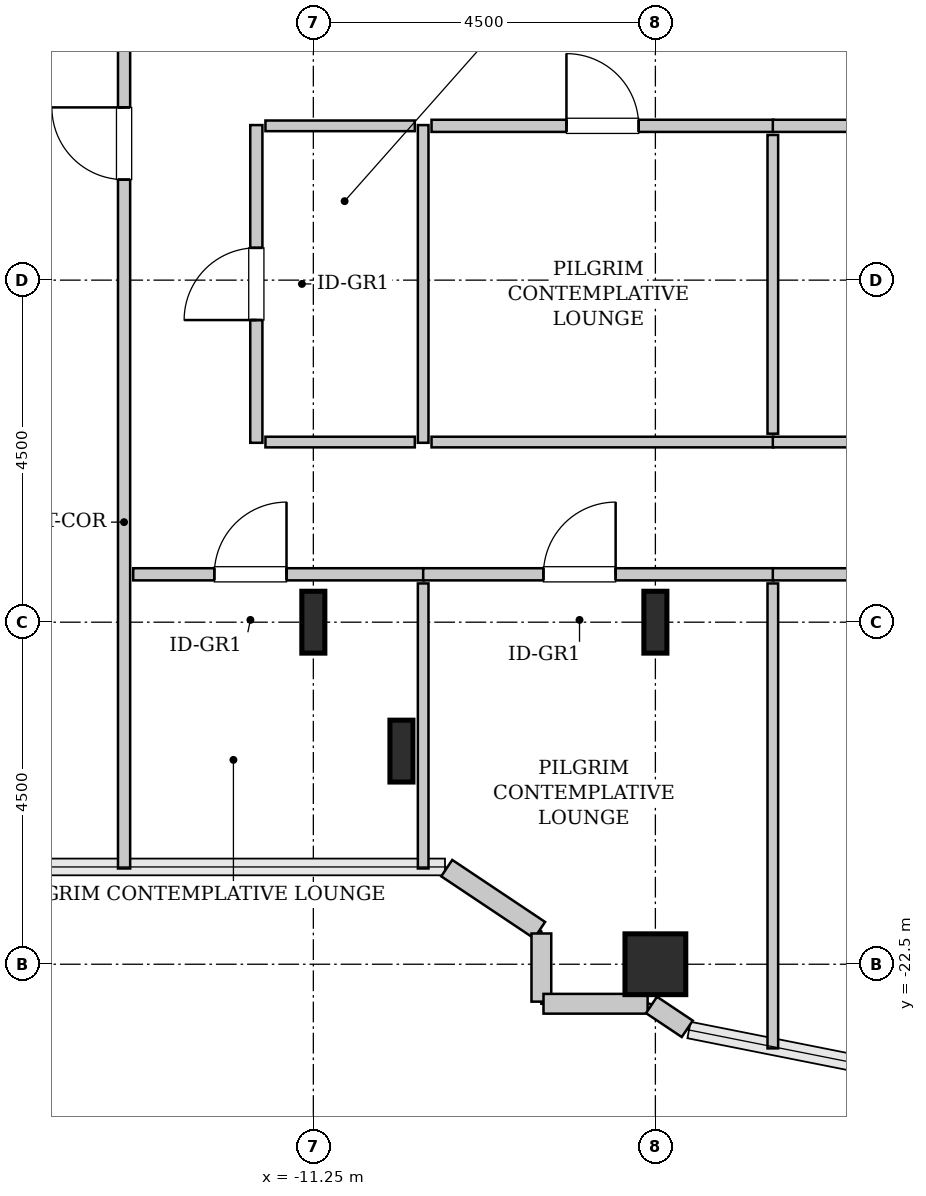
"""IFC4 building model, lengths in metres.
Left out: names, types, materials, properties, quantities, classifications, styles, units other than length and angle.
Written with IfcOpenShell. Run it as: python <this file> out.ifc"""

import sys

from ifc_helpers import new_model, si_unit, direction, frame, frame_2d, origin, origin_2d, place, context, subcontext, project, spatial, rectangle, hollow_rectangle, i_section, extrude, source, transform, mapped, element, fill, save


model = new_model("IFC4")
c1 = context("Model", 3, precision=1e-05, world=origin(), true_north=direction((0.0, 1.0)))
c2 = subcontext(c1, "Body", "Model", "MODEL_VIEW")
j1 = project(units=[si_unit("LENGTHUNIT", "METRE"), si_unit("PLANEANGLEUNIT", "RADIAN")], contexts=[c1])
p1 = place(None, origin())
s1 = spatial("IfcSite", under=j1, at=p1, CompositionType="ELEMENT")
p2 = place(p1, origin())
s2 = spatial("IfcBuilding", under=s1, at=p2, CompositionType="ELEMENT")
p3 = place(p2, frame((0.0, 0.0, 175.4)))
s3 = spatial("IfcBuildingStorey", under=s2, at=p3, CompositionType="ELEMENT", Elevation=175.4)
m1 = source(origin(), c2, "Body", "SweptSolid", [
    extrude(i_section(OverallWidth=0.303, OverallDepth=0.814, WebThickness=0.021, FlangeThickness=0.04, FilletRadius=0.03, at=origin_2d()), origin(), (0.0, 0.0, 1.0), 3.8),
])
for number, where, z_axis, x_axis in (
    (1, (-11.25, -18.0, 0.0), (0.0, 0.0, 1.0), (1.0, 0.0, 0.0)),
    (2, (-10.091, -19.696, 0.0), (0.0, 0.0, 1.0), (1.0, 0.0, 0.0)),
):
    element("IfcColumn", number, at=place(p3, frame(where, z_axis=z_axis, x_axis=x_axis)), inside=s3, PredefinedType="COLUMN", context=c2, shape_type="MappedRepresentation", body=[
        mapped(m1, transform((0.0, 0.0, 0.0), x_axis=(1.0, 0.0, 0.0), y_axis=(0.0, 1.0, 0.0), z_axis=(0.0, 0.0, 1.0), scale=1.0)),
    ])
m2 = source(origin(), c2, "Body", "SweptSolid", [
    extrude(hollow_rectangle(XDim=0.8, YDim=0.8, WallThickness=0.04, InnerFilletRadius=0.04, OuterFilletRadius=0.08, at=origin_2d()), origin(), (0.0, 0.0, 1.0), 3.8),
])
p4 = place(p3, frame((-6.75, -22.5, 0.0), z_axis=(0.0, 0.0, 1.0), x_axis=(1.0, 0.0, 0.0)))
e3 = element("IfcColumn", 3, at=p4, inside=s3, PredefinedType="COLUMN", context=c2, shape_type="MappedRepresentation", body=[
    mapped(m2, transform((0.0, 0.0, 0.0), x_axis=(1.0, 0.0, 0.0), y_axis=(0.0, 1.0, 0.0), z_axis=(0.0, 0.0, 1.0), scale=1.0)),
])
p5 = place(p3, frame((-6.75, -18.0, 0.0), z_axis=(0.0, 0.0, 1.0), x_axis=(1.0, 0.0, 0.0)))
e4 = element("IfcColumn", 4, at=p5, inside=s3, PredefinedType="COLUMN", context=c2, shape_type="MappedRepresentation", body=[
    mapped(m1, transform((0.0, 0.0, 0.0), x_axis=(1.0, 0.0, 0.0), y_axis=(0.0, 1.0, 0.0), z_axis=(0.0, 0.0, 1.0), scale=1.0)),
])
m3 = source(origin(), c2, "Body", "SweptSolid", [
    extrude(rectangle(XDim=1.469, YDim=0.26, at=frame_2d((0.734, 0.0))), origin(), (0.0, 0.0, 1.0), 3.55),
])
p6 = place(p3, frame((-9.495, -21.236, 0.0), z_axis=(0.0, 0.0, 1.0), x_axis=(0.831461760506, -0.555581983884, 0.0)))
e5 = element("IfcWall", 5, at=p6, inside=s3, PredefinedType="SOLIDWALL", context=c2, shape_type="MappedRepresentation", body=[
    mapped(m3, transform((0.0, 0.0, 0.0), x_axis=(1.0, 0.0, 0.0), y_axis=(0.0, 1.0, 0.0), z_axis=(0.0, 0.0, 1.0), scale=1.0)),
])
m4 = source(origin(), c2, "Body", "SweptSolid", [
    extrude(rectangle(XDim=0.897, YDim=0.26, at=frame_2d((0.448, 0.0))), origin(), (0.0, 0.0, 1.0), 3.55),
])
p7 = place(p3, frame((-8.25, -22.095, 0.0), z_axis=(0.0, 0.0, 1.0), x_axis=(0.0, -1.0, 0.0)))
e6 = element("IfcWall", 6, at=p7, inside=s3, PredefinedType="SOLIDWALL", context=c2, shape_type="MappedRepresentation", body=[
    mapped(m4, transform((0.0, 0.0, 0.0), x_axis=(1.0, 0.0, 0.0), y_axis=(0.0, 1.0, 0.0), z_axis=(0.0, 0.0, 1.0), scale=1.0)),
])
m5 = source(origin(), c2, "Body", "SweptSolid", [
    extrude(rectangle(XDim=1.37, YDim=0.26, at=frame_2d((0.685, 0.0))), origin(), (0.0, 0.0, 1.0), 3.55),
])
p8 = place(p3, frame((-8.222, -23.02, 0.0), z_axis=(0.0, 0.0, 1.0), x_axis=(1.0, 0.0, 0.0)))
e7 = element("IfcWall", 7, at=p8, inside=s3, PredefinedType="SOLIDWALL", context=c2, shape_type="MappedRepresentation", body=[
    mapped(m5, transform((0.0, 0.0, 0.0), x_axis=(1.0, 0.0, 0.0), y_axis=(0.0, 1.0, 0.0), z_axis=(0.0, 0.0, 1.0), scale=1.0)),
])
m6 = source(origin(), c2, "Body", "SweptSolid", [
    extrude(rectangle(XDim=0.565, YDim=0.26, at=frame_2d((0.283, 0.0))), origin(), (0.0, 0.0, 1.0), 3.55),
])
p9 = place(p3, frame((-6.801, -23.036, 0.0), z_axis=(0.0, 0.0, 1.0), x_axis=(0.831651492666, -0.555297933317, 0.0)))
e8 = element("IfcWall", 8, at=p9, inside=s3, PredefinedType="SOLIDWALL", context=c2, shape_type="MappedRepresentation", body=[
    mapped(m6, transform((0.0, 0.0, 0.0), x_axis=(1.0, 0.0, 0.0), y_axis=(0.0, 1.0, 0.0), z_axis=(0.0, 0.0, 1.0), scale=1.0)),
])
m7 = source(origin(), c2, "Body", "SweptSolid", [
    extrude(rectangle(XDim=15.245, YDim=0.16, at=frame_2d((7.623, 0.0))), origin(), (0.0, 0.0, 1.0), 3.535),
])
p10 = place(p3, frame((-13.74, -21.24, 0.0), z_axis=(0.0, 0.0, 1.0), x_axis=(0.0, 1.0, 0.0)))
e9 = element("IfcWall", 9, at=p10, inside=s3, PredefinedType="PARTITIONING", context=c2, shape_type="MappedRepresentation", body=[
    mapped(m7, transform((0.0, 0.0, 0.0), x_axis=(1.0, 0.0, 0.0), y_axis=(0.0, 1.0, 0.0), z_axis=(0.0, 0.0, 1.0), scale=1.0)),
])
p11 = place(p10, frame((9.062, 0.0, 0.0)))
e10 = element("IfcOpeningElement", 10, at=p11, cuts=e9, PredefinedType="OPENING", context=c2, shape_type="SweptSolid", body=[
    extrude(rectangle(XDim=0.95, YDim=2.1, at=frame_2d((0.475, 1.05))), frame((0.0, 0.09, 0.0), z_axis=(0.0, -1.0, 0.0), x_axis=(1.0, 0.0, 0.0)), (0.0, 0.0, 1.0), 0.18),
])
m8 = source(origin(), c2, "Body", "SweptSolid", [
    extrude(rectangle(XDim=3.825, YDim=0.16, at=frame_2d((1.913, 0.0))), origin(), (0.0, 0.0, 1.0), 3.535),
])
p12 = place(p3, frame((-13.62, -17.37, 0.0), z_axis=(0.0, 0.0, 1.0), x_axis=(1.0, 0.0, 0.0)))
e11 = element("IfcWall", 11, at=p12, inside=s3, PredefinedType="PARTITIONING", context=c2, shape_type="MappedRepresentation", body=[
    mapped(m8, transform((0.0, 0.0, 0.0), x_axis=(1.0, 0.0, 0.0), y_axis=(0.0, 1.0, 0.0), z_axis=(0.0, 0.0, 1.0), scale=1.0)),
])
p13 = place(p12, frame((1.067, 0.0, 0.0)))
e12 = element("IfcOpeningElement", 12, at=p13, cuts=e11, PredefinedType="OPENING", context=c2, shape_type="SweptSolid", body=[
    extrude(rectangle(XDim=0.95, YDim=2.1, at=frame_2d((0.475, 1.05))), frame((0.0, 0.09, 0.0), z_axis=(0.0, -1.0, 0.0), x_axis=(1.0, 0.0, 0.0)), (0.0, 0.0, 1.0), 0.18),
])
m9 = source(origin(), c2, "Body", "SweptSolid", [
    extrude(rectangle(XDim=3.75, YDim=0.14, at=frame_2d((1.875, 0.0))), origin(), (0.0, 0.0, 1.0), 3.535),
])
p14 = place(p3, frame((-9.805, -21.24, 0.0), z_axis=(0.0, 0.0, 1.0), x_axis=(0.0, 1.0, 0.0)))
e13 = element("IfcWall", 13, at=p14, inside=s3, PredefinedType="PARTITIONING", context=c2, shape_type="MappedRepresentation", body=[
    mapped(m9, transform((0.0, 0.0, 0.0), x_axis=(1.0, 0.0, 0.0), y_axis=(0.0, 1.0, 0.0), z_axis=(0.0, 0.0, 1.0), scale=1.0)),
])
m10 = source(origin(), c2, "Body", "SweptSolid", [
    extrude(rectangle(XDim=4.18, YDim=0.16, at=frame_2d((2.09, 0.0))), origin(), (0.0, 0.0, 1.0), 3.535),
])
p15 = place(p3, frame((-12.0, -15.64, 0.0), z_axis=(0.0, 0.0, 1.0), x_axis=(0.0, 1.0, 0.0)))
e14 = element("IfcWall", 14, at=p15, inside=s3, PredefinedType="PARTITIONING", context=c2, shape_type="MappedRepresentation", body=[
    mapped(m10, transform((0.0, 0.0, 0.0), x_axis=(1.0, 0.0, 0.0), y_axis=(0.0, 1.0, 0.0), z_axis=(0.0, 0.0, 1.0), scale=1.0)),
])
p16 = place(p15, frame((1.615, 0.0, 0.0)))
e15 = element("IfcOpeningElement", 15, at=p16, cuts=e14, PredefinedType="OPENING", context=c2, shape_type="SweptSolid", body=[
    extrude(rectangle(XDim=0.95, YDim=2.1, at=frame_2d((0.475, 1.05))), frame((0.0, 0.09, 0.0), z_axis=(0.0, -1.0, 0.0), x_axis=(1.0, 0.0, 0.0)), (0.0, 0.0, 1.0), 0.18),
])
m11 = source(origin(), c2, "Body", "SweptSolid", [
    extrude(rectangle(XDim=4.18, YDim=0.14, at=frame_2d((2.09, 0.0))), origin(), (0.0, 0.0, 1.0), 3.535),
])
p17 = place(p3, frame((-9.805, -15.64, 0.0), z_axis=(0.0, 0.0, 1.0), x_axis=(0.0, 1.0, 0.0)))
e16 = element("IfcWall", 16, at=p17, inside=s3, PredefinedType="PARTITIONING", context=c2, shape_type="MappedRepresentation", body=[
    mapped(m11, transform((0.0, 0.0, 0.0), x_axis=(1.0, 0.0, 0.0), y_axis=(0.0, 1.0, 0.0), z_axis=(0.0, 0.0, 1.0), scale=1.0)),
])
m12 = source(origin(), c2, "Body", "SweptSolid", [
    extrude(rectangle(XDim=1.965, YDim=0.14, at=frame_2d((0.982, 0.0))), origin(), (0.0, 0.0, 1.0), 3.535),
])
for number, where, z_axis, x_axis in (
    (17, (-11.88, -11.47, 0.0), (0.0, 0.0, 1.0), (1.0, 0.0, 0.0)),
    (18, (-11.88, -15.63, 0.0), (0.0, 0.0, 1.0), (1.0, 0.0, 0.0)),
):
    element("IfcWall", number, at=place(p3, frame(where, z_axis=z_axis, x_axis=x_axis)), inside=s3, PredefinedType="PARTITIONING", context=c2, shape_type="MappedRepresentation", body=[
        mapped(m12, transform((0.0, 0.0, 0.0), x_axis=(1.0, 0.0, 0.0), y_axis=(0.0, 1.0, 0.0), z_axis=(0.0, 0.0, 1.0), scale=1.0)),
    ])
m13 = source(origin(), c2, "Body", "SweptSolid", [
    extrude(rectangle(XDim=4.61, YDim=0.16, at=frame_2d((2.305, 0.0))), origin(), (0.0, 0.0, 1.0), 3.535),
])
p18 = place(p3, frame((-9.805, -17.37, 0.0), z_axis=(0.0, 0.0, 1.0), x_axis=(1.0, 0.0, 0.0)))
e19 = element("IfcWall", 19, at=p18, inside=s3, PredefinedType="PARTITIONING", context=c2, shape_type="MappedRepresentation", body=[
    mapped(m13, transform((0.0, 0.0, 0.0), x_axis=(1.0, 0.0, 0.0), y_axis=(0.0, 1.0, 0.0), z_axis=(0.0, 0.0, 1.0), scale=1.0)),
])
p19 = place(p18, frame((1.582, 0.0, 0.0)))
e20 = element("IfcOpeningElement", 20, at=p19, cuts=e19, PredefinedType="OPENING", context=c2, shape_type="SweptSolid", body=[
    extrude(rectangle(XDim=0.95, YDim=2.1, at=frame_2d((0.475, 1.05))), frame((0.0, 0.09, 0.0), z_axis=(0.0, -1.0, 0.0), x_axis=(1.0, 0.0, 0.0)), (0.0, 0.0, 1.0), 0.18),
])
m14 = source(origin(), c2, "Body", "SweptSolid", [
    extrude(rectangle(XDim=6.117, YDim=0.14, at=frame_2d((3.059, 0.0))), origin(), (0.0, 0.0, 1.0), 3.535),
])
p20 = place(p3, frame((-5.205, -23.607, 0.0), z_axis=(0.0, 0.0, 1.0), x_axis=(0.0, 1.0, 0.0)))
e21 = element("IfcWall", 21, at=p20, inside=s3, PredefinedType="PARTITIONING", context=c2, shape_type="MappedRepresentation", body=[
    mapped(m14, transform((0.0, 0.0, 0.0), x_axis=(1.0, 0.0, 0.0), y_axis=(0.0, 1.0, 0.0), z_axis=(0.0, 0.0, 1.0), scale=1.0)),
])
m15 = source(origin(), c2, "Body", "SweptSolid", [
    extrude(rectangle(XDim=4.5, YDim=0.16, at=frame_2d((2.25, 0.0))), origin(), (0.0, 0.0, 1.0), 3.535),
])
p21 = place(p3, frame((-9.695, -11.47, 0.0), z_axis=(0.0, 0.0, 1.0), x_axis=(1.0, 0.0, 0.0)))
e22 = element("IfcWall", 22, at=p21, inside=s3, PredefinedType="PARTITIONING", context=c2, shape_type="MappedRepresentation", body=[
    mapped(m15, transform((0.0, 0.0, 0.0), x_axis=(1.0, 0.0, 0.0), y_axis=(0.0, 1.0, 0.0), z_axis=(0.0, 0.0, 1.0), scale=1.0)),
])
p22 = place(p21, frame((1.775, 0.0, 0.0)))
e23 = element("IfcOpeningElement", 23, at=p22, cuts=e22, PredefinedType="OPENING", context=c2, shape_type="SweptSolid", body=[
    extrude(rectangle(XDim=0.95, YDim=2.1, at=frame_2d((0.475, 1.05))), frame((0.0, 0.09, 0.0), z_axis=(0.0, -1.0, 0.0), x_axis=(1.0, 0.0, 0.0)), (0.0, 0.0, 1.0), 0.18),
])
m16 = source(origin(), c2, "Body", "SweptSolid", [
    extrude(rectangle(XDim=4.5, YDim=0.14, at=frame_2d((2.25, 0.0))), origin(), (0.0, 0.0, 1.0), 3.535),
])
p23 = place(p3, frame((-9.695, -15.63, 0.0), z_axis=(0.0, 0.0, 1.0), x_axis=(1.0, 0.0, 0.0)))
e24 = element("IfcWall", 24, at=p23, inside=s3, PredefinedType="PARTITIONING", context=c2, shape_type="MappedRepresentation", body=[
    mapped(m16, transform((0.0, 0.0, 0.0), x_axis=(1.0, 0.0, 0.0), y_axis=(0.0, 1.0, 0.0), z_axis=(0.0, 0.0, 1.0), scale=1.0)),
])
m17 = source(origin(), c2, "Body", "SweptSolid", [
    extrude(rectangle(XDim=3.93, YDim=0.14, at=frame_2d((1.965, 0.0))), origin(), (0.0, 0.0, 1.0), 3.535),
])
p24 = place(p3, frame((-5.205, -15.52, 0.0), z_axis=(0.0, 0.0, 1.0), x_axis=(0.0, 1.0, 0.0)))
e25 = element("IfcWall", 25, at=p24, inside=s3, PredefinedType="PARTITIONING", context=c2, shape_type="MappedRepresentation", body=[
    mapped(m17, transform((0.0, 0.0, 0.0), x_axis=(1.0, 0.0, 0.0), y_axis=(0.0, 1.0, 0.0), z_axis=(0.0, 0.0, 1.0), scale=1.0)),
])
m18 = source(origin(), c2, "Body", "SweptSolid", [
    extrude(rectangle(XDim=7.01, YDim=0.16, at=frame_2d((3.505, 0.0))), origin(), (0.0, 0.0, 1.0), 3.535),
])
p25 = place(p3, frame((-5.205, -17.37, 0.0), z_axis=(0.0, 0.0, 1.0), x_axis=(1.0, 0.0, 0.0)))
e26 = element("IfcWall", 26, at=p25, inside=s3, PredefinedType="PARTITIONING", context=c2, shape_type="MappedRepresentation", body=[
    mapped(m18, transform((0.0, 0.0, 0.0), x_axis=(1.0, 0.0, 0.0), y_axis=(0.0, 1.0, 0.0), z_axis=(0.0, 0.0, 1.0), scale=1.0)),
])
p26 = place(p25, frame((3.47, 0.0, 0.0)))
e27 = element("IfcOpeningElement", 27, at=p26, cuts=e26, PredefinedType="OPENING", context=c2, shape_type="SweptSolid", body=[
    extrude(rectangle(XDim=0.95, YDim=2.1, at=frame_2d((0.475, 1.05))), frame((0.0, 0.09, 0.0), z_axis=(0.0, -1.0, 0.0), x_axis=(1.0, 0.0, 0.0)), (0.0, 0.0, 1.0), 0.18),
])
p27 = place(p3, frame((-5.205, -11.47, 0.0), z_axis=(0.0, 0.0, 1.0), x_axis=(1.0, 0.0, 0.0)))
e28 = element("IfcWall", 28, at=p27, inside=s3, PredefinedType="PARTITIONING", context=c2, shape_type="MappedRepresentation", body=[
    mapped(m18, transform((0.0, 0.0, 0.0), x_axis=(1.0, 0.0, 0.0), y_axis=(0.0, 1.0, 0.0), z_axis=(0.0, 0.0, 1.0), scale=1.0)),
])
p28 = place(p27, frame((3.03, 0.0, 0.0)))
e29 = element("IfcOpeningElement", 29, at=p28, cuts=e28, PredefinedType="OPENING", context=c2, shape_type="SweptSolid", body=[
    extrude(rectangle(XDim=0.95, YDim=2.1, at=frame_2d((0.475, 1.05))), frame((0.0, 0.09, 0.0), z_axis=(0.0, -1.0, 0.0), x_axis=(1.0, 0.0, 0.0)), (0.0, 0.0, 1.0), 0.18),
])
m19 = source(origin(), c2, "Body", "SweptSolid", [
    extrude(rectangle(XDim=7.01, YDim=0.14, at=frame_2d((3.505, 0.0))), origin(), (0.0, 0.0, 1.0), 3.535),
])
p29 = place(p3, frame((-5.205, -15.63, 0.0), z_axis=(0.0, 0.0, 1.0), x_axis=(1.0, 0.0, 0.0)))
e30 = element("IfcWall", 30, at=p29, inside=s3, PredefinedType="PARTITIONING", context=c2, shape_type="MappedRepresentation", body=[
    mapped(m19, transform((0.0, 0.0, 0.0), x_axis=(1.0, 0.0, 0.0), y_axis=(0.0, 1.0, 0.0), z_axis=(0.0, 0.0, 1.0), scale=1.0)),
])
m20 = source(origin(), c2, "Body", "SweptSolid", [
    extrude(rectangle(XDim=0.95, YDim=2.1, at=frame_2d((0.475, 1.05))), frame((0.0, 0.025, 0.0), z_axis=(0.0, -1.0, 0.0), x_axis=(1.0, 0.0, 0.0)), (0.0, 0.0, 1.0), 0.05),
])
p30 = place(p11, origin())
e31 = element("IfcDoor", 31, at=p30, inside=s3, OperationType="SINGLE_SWING_RIGHT", PredefinedType="DOOR", context=c2, shape_type="MappedRepresentation", body=[
    mapped(m20, transform((0.0, 0.0, 0.0), x_axis=(1.0, 0.0, 0.0), y_axis=(0.0, 1.0, 0.0), z_axis=(0.0, 0.0, 1.0), scale=1.0)),
])
fill(e10, e31)
p31 = place(p13, origin())
e32 = element("IfcDoor", 32, at=p31, inside=s3, OperationType="SINGLE_SWING_RIGHT", PredefinedType="DOOR", context=c2, shape_type="MappedRepresentation", body=[
    mapped(m20, transform((0.0, 0.0, 0.0), x_axis=(1.0, 0.0, 0.0), y_axis=(0.0, 1.0, 0.0), z_axis=(0.0, 0.0, 1.0), scale=1.0)),
])
fill(e12, e32)
p32 = place(p16, origin())
e33 = element("IfcDoor", 33, at=p32, inside=s3, OperationType="SINGLE_SWING_LEFT", PredefinedType="DOOR", context=c2, shape_type="MappedRepresentation", body=[
    mapped(m20, transform((0.0, 0.0, 0.0), x_axis=(1.0, 0.0, 0.0), y_axis=(0.0, 1.0, 0.0), z_axis=(0.0, 0.0, 1.0), scale=1.0)),
])
fill(e15, e33)
p33 = place(p19, origin())
e34 = element("IfcDoor", 34, at=p33, inside=s3, OperationType="SINGLE_SWING_RIGHT", PredefinedType="DOOR", context=c2, shape_type="MappedRepresentation", body=[
    mapped(m20, transform((0.0, 0.0, 0.0), x_axis=(1.0, 0.0, 0.0), y_axis=(0.0, 1.0, 0.0), z_axis=(0.0, 0.0, 1.0), scale=1.0)),
])
fill(e20, e34)
p34 = place(p22, origin())
e35 = element("IfcDoor", 35, at=p34, inside=s3, OperationType="SINGLE_SWING_LEFT", PredefinedType="DOOR", context=c2, shape_type="MappedRepresentation", body=[
    mapped(m20, transform((0.0, 0.0, 0.0), x_axis=(1.0, 0.0, 0.0), y_axis=(0.0, 1.0, 0.0), z_axis=(0.0, 0.0, 1.0), scale=1.0)),
])
fill(e23, e35)
save(model, sys.argv[1])
